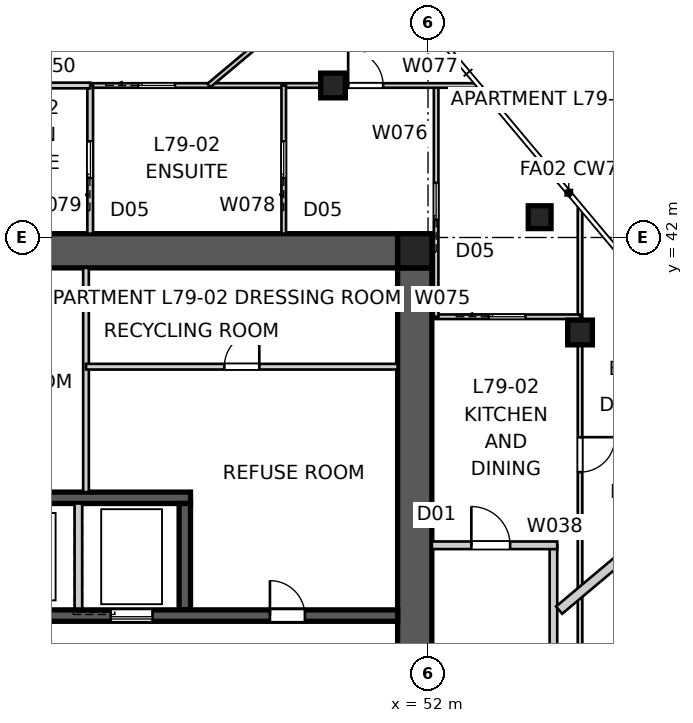
"""IFC4 building model, lengths in metres.
Left out: names, types, materials, properties, quantities, classifications, styles, units other than length and angle.
Written with IfcOpenShell. Run it as: python <this file> out.ifc"""

import sys

from ifc_helpers import new_model, si_unit, direction, frame, frame_2d, origin, origin_2d, place, context, subcontext, project, spatial, polyline, rectangle, outline, extrude, element, fill, save


model = new_model("IFC4")
c1 = context("Model", 3, precision=1e-05, world=origin(), true_north=direction((0.0, 1.0)))
c2 = subcontext(c1, "Body", "Model", "MODEL_VIEW")
j1 = project(units=[si_unit("LENGTHUNIT", "METRE"), si_unit("PLANEANGLEUNIT", "RADIAN")], contexts=[c1])
p1 = place(None, origin())
s1 = spatial("IfcSite", under=j1, at=p1, CompositionType="ELEMENT")
p2 = place(p1, origin())
s2 = spatial("IfcBuilding", under=s1, at=p2, CompositionType="ELEMENT")
p3 = place(p2, frame((0.0, 0.0, 286.2)))
s3 = spatial("IfcBuildingStorey", under=s2, at=p3, CompositionType="ELEMENT", Elevation=286.2)
p4 = place(p3, frame((28.8, 41.65, 0.0), z_axis=(0.0, 0.0, 1.0), x_axis=(1.0, 0.0, 0.0)))
e1 = element("IfcWall", 1, at=p4, inside=s3, PredefinedType="SHEAR", context=c2, shape_type="SweptSolid", body=[
    extrude(outline(polyline([(0.0, -0.45), (22.4, -0.45), (22.4, -0.025), (22.85, -0.025), (22.85, 0.025), (22.4, 0.025), (22.4, 0.45), (0.0, 0.45), (0.0, 0.025), (-0.45, 0.025), (-0.45, -0.025), (0.0, -0.025), (0.0, -0.45)])), origin(), (0.0, 0.0, 1.0), 3.4),
])
p5 = place(p3, frame((51.65, 18.8, 0.0), z_axis=(0.0, 0.0, 1.0), x_axis=(0.0, 1.0, 0.0)))
e2 = element("IfcWall", 2, at=p5, inside=s3, PredefinedType="SHEAR", context=c2, shape_type="SweptSolid", body=[
    extrude(outline(polyline([(0.0, -0.45), (22.4, -0.45), (22.4, -0.025), (22.85, -0.025), (22.85, 0.025), (22.4, 0.025), (22.4, 0.45), (0.0, 0.45), (0.0, 0.025), (-0.45, 0.025), (-0.45, -0.025), (0.0, -0.025), (0.0, -0.45)])), origin(), (0.0, 0.0, 1.0), 3.4),
])
p6 = place(p5, frame((11.14, 0.0, 0.0)))
e3 = element("IfcOpeningElement", 3, at=p6, cuts=e2, PredefinedType="OPENING", context=c2, shape_type="SweptSolid", body=[
    extrude(rectangle(XDim=1.02, YDim=2.4, at=frame_2d((0.51, 1.2))), frame((0.0, 0.46, 0.0), z_axis=(0.0, -1.0, 0.0), x_axis=(1.0, 0.0, 0.0)), (0.0, 0.0, 1.0), 0.92),
])
p7 = place(p3, frame((28.8, 32.05, 0.0), z_axis=(0.0, 0.0, 1.0), x_axis=(1.0, 0.0, 0.0)))
e4 = element("IfcWall", 4, at=p7, inside=s3, PredefinedType="SHEAR", context=c2, shape_type="SweptSolid", body=[
    extrude(rectangle(XDim=22.4, YDim=0.3, at=frame_2d((11.2, 0.0))), origin(), (0.0, 0.0, 1.0), 3.4),
])
p8 = place(p7, frame((19.04, 0.0, 0.0)))
e5 = element("IfcOpeningElement", 5, at=p8, cuts=e4, PredefinedType="OPENING", context=c2, shape_type="SweptSolid", body=[
    extrude(rectangle(XDim=0.92, YDim=2.1, at=frame_2d((0.46, 1.05))), frame((0.0, 0.16, 0.0), z_axis=(0.0, -1.0, 0.0), x_axis=(1.0, 0.0, 0.0)), (0.0, 0.0, 1.0), 0.32),
])
p9 = place(p7, frame((1.265, 0.0, 0.0)))
e6 = element("IfcOpeningElement", 6, at=p9, cuts=e4, PredefinedType="OPENING", context=c2, shape_type="SweptSolid", body=[
    extrude(rectangle(XDim=1.02, YDim=2.1, at=frame_2d((0.51, 1.05))), frame((0.0, 0.16, 0.0), z_axis=(0.0, -1.0, 0.0), x_axis=(1.0, 0.0, 0.0)), (0.0, 0.0, 1.0), 0.32),
])
p10 = place(p7, frame((4.015, 0.0, 0.0)))
e7 = element("IfcOpeningElement", 7, at=p10, cuts=e4, PredefinedType="OPENING", context=c2, shape_type="SweptSolid", body=[
    extrude(rectangle(XDim=0.92, YDim=2.1, at=frame_2d((0.46, 1.05))), frame((0.0, 0.16, 0.0), z_axis=(0.0, -1.0, 0.0), x_axis=(1.0, 0.0, 0.0)), (0.0, 0.0, 1.0), 0.32),
])
p11 = place(p7, frame((6.115, 0.0, 0.0)))
e8 = element("IfcOpeningElement", 8, at=p11, cuts=e4, PredefinedType="OPENING", context=c2, shape_type="SweptSolid", body=[
    extrude(rectangle(XDim=0.92, YDim=2.1, at=frame_2d((0.46, 1.05))), frame((0.0, 0.16, 0.0), z_axis=(0.0, -1.0, 0.0), x_axis=(1.0, 0.0, 0.0)), (0.0, 0.0, 1.0), 0.32),
])
p12 = place(p7, frame((9.79, 0.0, 0.0)))
e9 = element("IfcOpeningElement", 9, at=p12, cuts=e4, PredefinedType="OPENING", context=c2, shape_type="SweptSolid", body=[
    extrude(rectangle(XDim=0.92, YDim=2.1, at=frame_2d((0.46, 1.05))), frame((0.0, 0.16, 0.0), z_axis=(0.0, -1.0, 0.0), x_axis=(1.0, 0.0, 0.0)), (0.0, 0.0, 1.0), 0.32),
])
p13 = place(p7, frame((12.05, 0.0, 0.0)))
e10 = element("IfcOpeningElement", 10, at=p13, cuts=e4, PredefinedType="OPENING", context=c2, shape_type="SweptSolid", body=[
    extrude(rectangle(XDim=1.1, YDim=2.1, at=frame_2d((0.55, 1.05))), frame((0.0, 0.16, 0.0), z_axis=(0.0, -1.0, 0.0), x_axis=(1.0, 0.0, 0.0)), (0.0, 0.0, 1.0), 0.32),
])
p14 = place(p7, frame((14.85, 0.0, 0.0)))
e11 = element("IfcOpeningElement", 11, at=p14, cuts=e4, PredefinedType="OPENING", context=c2, shape_type="SweptSolid", body=[
    extrude(rectangle(XDim=1.1, YDim=2.1, at=frame_2d((0.55, 1.05))), frame((0.0, 0.16, 0.0), z_axis=(0.0, -1.0, 0.0), x_axis=(1.0, 0.0, 0.0)), (0.0, 0.0, 1.0), 0.32),
])
p15 = place(p3, frame((34.25, 35.15, 0.0), z_axis=(0.0, 0.0, 1.0), x_axis=(1.0, 0.0, 0.0)))
e12 = element("IfcWall", 12, at=p15, inside=s3, PredefinedType="SHEAR", context=c2, shape_type="SweptSolid", body=[
    extrude(rectangle(XDim=11.5, YDim=0.3, at=frame_2d((5.75, 0.0))), origin(), (0.0, 0.0, 1.0), 3.4),
])
p16 = place(p3, frame((42.8, 32.2, 0.0), z_axis=(0.0, 0.0, 1.0), x_axis=(0.0, 1.0, 0.0)))
e13 = element("IfcWall", 13, at=p16, inside=s3, PredefinedType="SOLIDWALL", context=c2, shape_type="SweptSolid", body=[
    extrude(rectangle(XDim=2.8, YDim=0.2, at=frame_2d((1.4, 0.0))), origin(), (0.0, 0.0, 1.0), 3.4),
])
p17 = place(p3, frame((45.6, 32.2, 0.0), z_axis=(0.0, 0.0, 1.0), x_axis=(0.0, 1.0, 0.0)))
e14 = element("IfcWall", 14, at=p17, inside=s3, PredefinedType="SHEAR", context=c2, shape_type="SweptSolid", body=[
    extrude(rectangle(XDim=2.8, YDim=0.3, at=frame_2d((1.4, 0.0))), origin(), (0.0, 0.0, 1.0), 3.4),
])
p18 = place(p3, frame((51.65, 41.65, 0.0), z_axis=(0.0, 0.0, 1.0), x_axis=(1.0, 0.0, 0.0)))
e15 = element("IfcColumn", 15, at=p18, inside=s3, PredefinedType="COLUMN", context=c2, shape_type="SweptSolid", body=[
    extrude(rectangle(XDim=0.9, YDim=0.9, at=origin_2d()), origin(), (0.0, 0.0, 1.0), 3.4),
])
p19 = place(p3, frame((54.938, 42.534, 0.0), z_axis=(0.0, 0.0, 1.0), x_axis=(1.0, 0.0, 0.0)))
e16 = element("IfcColumn", 16, at=p19, inside=s3, PredefinedType="COLUMN", context=c2, shape_type="SweptSolid", body=[
    extrude(rectangle(XDim=0.6, YDim=0.6, at=origin_2d()), origin(), (0.0, 0.0, 1.0), 3.4),
])
for number, where, z_axis, x_axis in (
    (17, (56.0, 39.5, 0.0), (0.0, 0.0, 1.0), (1.0, 0.0, 0.0)),
    (18, (49.5, 46.0, 0.0), (0.0, 0.0, 1.0), (1.0, 0.0, 0.0)),
):
    element("IfcColumn", number, at=place(p3, frame(where, z_axis=z_axis, x_axis=x_axis)), inside=s3, PredefinedType="COLUMN", context=c2, shape_type="SweptSolid", body=[
        extrude(rectangle(XDim=0.65, YDim=0.65, at=origin_2d()), origin(), (0.0, 0.0, 1.0), 3.4),
    ])
p20 = place(p3, frame((55.3, 26.1, 0.0), z_axis=(0.0, 0.0, 1.0), x_axis=(0.0, 1.0, 0.0)))
e19 = element("IfcWall", 19, at=p20, inside=s3, PredefinedType="PARTITIONING", context=c2, shape_type="SweptSolid", body=[
    extrude(rectangle(XDim=7.8, YDim=0.2, at=frame_2d((3.9, 0.0))), origin(), (0.0, 0.0, 1.0), 3.25),
])
p21 = place(p3, frame((52.1, 33.9, 0.0), z_axis=(0.0, 0.0, 1.0), x_axis=(1.0, 0.0, 0.0)))
e20 = element("IfcWall", 20, at=p21, inside=s3, PredefinedType="PARTITIONING", context=c2, shape_type="SweptSolid", body=[
    extrude(rectangle(XDim=3.3, YDim=0.2, at=frame_2d((1.65, 0.0))), origin(), (0.0, 0.0, 1.0), 3.25),
])
p22 = place(p21, frame((1.04, 0.0, 0.0)))
e21 = element("IfcOpeningElement", 21, at=p22, cuts=e20, PredefinedType="OPENING", context=c2, shape_type="SweptSolid", body=[
    extrude(rectangle(XDim=1.02, YDim=2.34, at=frame_2d((0.51, 1.17))), frame((0.0, 0.11, 0.0), z_axis=(0.0, -1.0, 0.0), x_axis=(1.0, 0.0, 0.0)), (0.0, 0.0, 1.0), 0.22),
])
p23 = place(p3, frame((61.007, 36.857, 0.0), z_axis=(0.0, 0.0, 1.0), x_axis=(-0.766054150891, -0.642776040237, 0.0)))
e22 = element("IfcWall", 22, at=p23, inside=s3, PredefinedType="PARTITIONING", context=c2, shape_type="SweptSolid", body=[
    extrude(rectangle(XDim=7.254, YDim=0.25, at=frame_2d((3.627, 0.0))), origin(), (0.0, 0.0, 1.0), 3.25),
])
p24 = place(p3, frame((43.0, 41.2, 0.0), z_axis=(0.0, 0.0, 1.0), x_axis=(0.0, -1.0, 0.0)))
e23 = element("IfcWall", 23, at=p24, inside=s3, PredefinedType="SOLIDWALL", context=c2, shape_type="SweptSolid", body=[
    extrude(rectangle(XDim=5.9, YDim=0.15, at=frame_2d((2.95, 0.0))), origin(), (0.0, 0.0, 1.0), 3.25),
])
p25 = place(p3, frame((43.0, 38.6, 0.0), z_axis=(0.0, 0.0, 1.0), x_axis=(1.0, 0.0, 0.0)))
e24 = element("IfcWall", 24, at=p25, inside=s3, PredefinedType="SOLIDWALL", context=c2, shape_type="SweptSolid", body=[
    extrude(rectangle(XDim=8.2, YDim=0.15, at=frame_2d((4.1, 0.0))), origin(), (0.0, 0.0, 1.0), 3.25),
])
p26 = place(p25, frame((3.64, 0.0, 0.0)))
e25 = element("IfcOpeningElement", 25, at=p26, cuts=e24, PredefinedType="OPENING", context=c2, shape_type="SweptSolid", body=[
    extrude(rectangle(XDim=0.92, YDim=2.1, at=frame_2d((0.46, 1.05))), frame((0.0, 0.085, 0.0), z_axis=(0.0, -1.0, 0.0), x_axis=(1.0, 0.0, 0.0)), (0.0, 0.0, 1.0), 0.17),
])
p27 = place(p3, frame((56.0, 42.762, 0.0), z_axis=(0.0, 0.0, 1.0), x_axis=(0.0, -1.0, 0.0)))
e26 = element("IfcWall", 26, at=p27, inside=s3, PredefinedType="PARTITIONING", context=c2, shape_type="SweptSolid", body=[
    extrude(rectangle(XDim=18.995, YDim=0.12, at=frame_2d((9.498, 0.0))), origin(), (0.0, 0.0, 1.0), 2.55),
])
p28 = place(p27, frame((17.238, 0.0, 0.0)))
e27 = element("IfcOpeningElement", 27, at=p28, cuts=e26, PredefinedType="OPENING", context=c2, shape_type="SweptSolid", body=[
    extrude(rectangle(XDim=0.92, YDim=2.34, at=frame_2d((0.46, 1.17))), frame((0.0, 0.07, 0.0), z_axis=(0.0, -1.0, 0.0), x_axis=(1.0, 0.0, 0.0)), (0.0, 0.0, 1.0), 0.14),
])
p29 = place(p27, frame((6.017, 0.0, 0.0)))
e28 = element("IfcOpeningElement", 28, at=p29, cuts=e26, PredefinedType="OPENING", context=c2, shape_type="SweptSolid", body=[
    extrude(rectangle(XDim=0.92, YDim=2.34, at=frame_2d((0.46, 1.17))), frame((0.0, 0.07, 0.0), z_axis=(0.0, -1.0, 0.0), x_axis=(1.0, 0.0, 0.0)), (0.0, 0.0, 1.0), 0.14),
])
p30 = place(p3, frame((52.163, 39.914, 0.0), z_axis=(0.0, 0.0, 1.0), x_axis=(1.0, 0.0, 0.0)))
e29 = element("IfcWall", 29, at=p30, inside=s3, PredefinedType="PARTITIONING", context=c2, shape_type="SweptSolid", body=[
    extrude(rectangle(XDim=3.837, YDim=0.12, at=frame_2d((1.918, 0.0))), origin(), (0.0, 0.0, 1.0), 3.25),
])
p31 = place(p30, frame((1.438, 0.0, 0.0)))
e30 = element("IfcOpeningElement", 30, at=p31, cuts=e29, PredefinedType="OPENING", context=c2, shape_type="SweptSolid", body=[
    extrude(rectangle(XDim=0.96, YDim=2.1, at=frame_2d((0.48, 1.05))), frame((0.0, 0.07, 0.0), z_axis=(0.0, -1.0, 0.0), x_axis=(1.0, 0.0, 0.0)), (0.0, 0.0, 1.0), 0.14),
])
p32 = place(p3, frame((52.213, 39.914, 0.0), z_axis=(0.0, 0.0, 1.0), x_axis=(0.0, 1.0, 0.0)))
e31 = element("IfcWall", 31, at=p32, inside=s3, PredefinedType="PARTITIONING", context=c2, shape_type="SweptSolid", body=[
    extrude(rectangle(XDim=6.086, YDim=0.12, at=frame_2d((3.043, 0.0))), origin(), (0.0, 0.0, 1.0), 3.25),
])
p33 = place(p32, frame((2.563, 0.0, 0.0)))
e32 = element("IfcOpeningElement", 32, at=p33, cuts=e31, PredefinedType="OPENING", context=c2, shape_type="SweptSolid", body=[
    extrude(rectangle(XDim=0.96, YDim=2.1, at=frame_2d((0.48, 1.05))), frame((0.0, 0.07, 0.0), z_axis=(0.0, -1.0, 0.0), x_axis=(1.0, 0.0, 0.0)), (0.0, 0.0, 1.0), 0.14),
])
p34 = place(p3, frame((43.11, 46.0, 0.0), z_axis=(0.0, 0.0, 1.0), x_axis=(1.0, 0.0, 0.0)))
e33 = element("IfcWall", 33, at=p34, inside=s3, PredefinedType="PARTITIONING", context=c2, shape_type="SweptSolid", body=[
    extrude(rectangle(XDim=10.173, YDim=0.12, at=frame_2d((5.086, 0.0))), origin(), (0.0, 0.0, 1.0), 2.55),
])
p35 = place(p34, frame((6.788, 0.0, 0.0)))
e34 = element("IfcOpeningElement", 34, at=p35, cuts=e33, PredefinedType="OPENING", context=c2, shape_type="SweptSolid", body=[
    extrude(rectangle(XDim=0.92, YDim=2.34, at=frame_2d((0.46, 1.17))), frame((0.0, 0.07, 0.0), z_axis=(0.0, -1.0, 0.0), x_axis=(1.0, 0.0, 0.0)), (0.0, 0.0, 1.0), 0.14),
])
p36 = place(p34, frame((1.271, 0.0, 0.0)))
e35 = element("IfcOpeningElement", 35, at=p36, cuts=e33, PredefinedType="OPENING", context=c2, shape_type="SweptSolid", body=[
    extrude(rectangle(XDim=0.96, YDim=2.1, at=frame_2d((0.48, 1.05))), frame((0.0, 0.07, 0.0), z_axis=(0.0, -1.0, 0.0), x_axis=(1.0, 0.0, 0.0)), (0.0, 0.0, 1.0), 0.14),
])
p37 = place(p3, frame((48.203, 42.1, 0.0), z_axis=(0.0, 0.0, 1.0), x_axis=(0.0, 1.0, 0.0)))
e36 = element("IfcWall", 36, at=p37, inside=s3, PredefinedType="PARTITIONING", context=c2, shape_type="SweptSolid", body=[
    extrude(rectangle(XDim=3.9, YDim=0.12, at=frame_2d((1.95, 0.0))), origin(), (0.0, 0.0, 1.0), 3.25),
])
p38 = place(p37, frame((1.47, 0.0, 0.0)))
e37 = element("IfcOpeningElement", 37, at=p38, cuts=e36, PredefinedType="OPENING", context=c2, shape_type="SweptSolid", body=[
    extrude(rectangle(XDim=0.96, YDim=2.1, at=frame_2d((0.48, 1.05))), frame((0.0, 0.07, 0.0), z_axis=(0.0, -1.0, 0.0), x_axis=(1.0, 0.0, 0.0)), (0.0, 0.0, 1.0), 0.14),
])
p39 = place(p3, frame((43.11, 42.1, 0.0), z_axis=(0.0, 0.0, 1.0), x_axis=(0.0, 1.0, 0.0)))
e38 = element("IfcWall", 38, at=p39, inside=s3, PredefinedType="SOLIDWALL", context=c2, shape_type="SweptSolid", body=[
    extrude(rectangle(XDim=3.9, YDim=0.15, at=frame_2d((1.95, 0.0))), origin(), (0.0, 0.0, 1.0), 3.25),
])
p40 = place(p39, frame((1.47, 0.0, 0.0)))
e39 = element("IfcOpeningElement", 39, at=p40, cuts=e38, PredefinedType="OPENING", context=c2, shape_type="SweptSolid", body=[
    extrude(rectangle(XDim=0.96, YDim=2.1, at=frame_2d((0.48, 1.05))), frame((0.0, 0.085, 0.0), z_axis=(0.0, -1.0, 0.0), x_axis=(1.0, 0.0, 0.0)), (0.0, 0.0, 1.0), 0.17),
])
p41 = place(p3, frame((39.153, 46.0, 0.0), z_axis=(0.0, 0.0, 1.0), x_axis=(1.0, 0.0, 0.0)))
e40 = element("IfcWall", 40, at=p41, inside=s3, PredefinedType="SOLIDWALL", context=c2, shape_type="SweptSolid", body=[
    extrude(rectangle(XDim=3.958, YDim=0.15, at=frame_2d((1.979, 0.0))), origin(), (0.0, 0.0, 1.0), 3.25),
])
p42 = place(p3, frame((47.719, 52.631, 0.0), z_axis=(0.0, 0.0, 1.0), x_axis=(-0.766052076481, -0.64277851249, 0.0)))
e41 = element("IfcWall", 41, at=p42, inside=s3, PredefinedType="PARTITIONING", context=c2, shape_type="SweptSolid", body=[
    extrude(rectangle(XDim=10.316, YDim=0.12, at=frame_2d((5.158, 0.0))), origin(), (0.0, 0.0, 1.0), 3.25),
])
p43 = place(p3, frame((50.37, 49.471, 0.0), z_axis=(0.0, 0.0, 1.0), x_axis=(-0.766056536168, -0.642773197476, 0.0)))
e42 = element("IfcWall", 42, at=p43, inside=s3, PredefinedType="PARTITIONING", context=c2, shape_type="SweptSolid", body=[
    extrude(rectangle(XDim=5.4, YDim=0.12, at=frame_2d((2.7, 0.0))), origin(), (0.0, 0.0, 1.0), 3.25),
])
p44 = place(p8, origin())
e43 = element("IfcDoor", 43, at=p44, inside=s3, OperationType="SINGLE_SWING_LEFT", PredefinedType="DOOR", context=c2, shape_type="SweptSolid", body=[
    extrude(rectangle(XDim=0.92, YDim=2.1, at=frame_2d((0.46, 1.05))), frame((0.0, 0.025, 0.0), z_axis=(0.0, -1.0, 0.0), x_axis=(1.0, 0.0, 0.0)), (0.0, 0.0, 1.0), 0.05),
])
fill(e5, e43)
p45 = place(p22, origin())
e44 = element("IfcDoor", 44, at=p45, inside=s3, OperationType="SINGLE_SWING_LEFT", PredefinedType="DOOR", context=c2, shape_type="SweptSolid", body=[
    extrude(rectangle(XDim=1.02, YDim=2.34, at=frame_2d((0.51, 1.17))), frame((0.0, 0.025, 0.0), z_axis=(0.0, -1.0, 0.0), x_axis=(1.0, 0.0, 0.0)), (0.0, 0.0, 1.0), 0.05),
])
fill(e21, e44)
p46 = place(p26, origin())
e45 = element("IfcDoor", 45, at=p46, inside=s3, OperationType="SINGLE_SWING_RIGHT", PredefinedType="DOOR", context=c2, shape_type="SweptSolid", body=[
    extrude(rectangle(XDim=0.92, YDim=2.1, at=frame_2d((0.46, 1.05))), frame((0.0, 0.025, 0.0), z_axis=(0.0, -1.0, 0.0), x_axis=(1.0, 0.0, 0.0)), (0.0, 0.0, 1.0), 0.05),
])
fill(e25, e45)
p47 = place(p29, origin())
e46 = element("IfcDoor", 46, at=p47, inside=s3, OperationType="SINGLE_SWING_LEFT", PredefinedType="DOOR", context=c2, shape_type="SweptSolid", body=[
    extrude(rectangle(XDim=0.92, YDim=2.34, at=frame_2d((0.46, 1.17))), frame((0.0, 0.025, 0.0), z_axis=(0.0, -1.0, 0.0), x_axis=(1.0, 0.0, 0.0)), (0.0, 0.0, 1.0), 0.05),
])
fill(e28, e46)
p48 = place(p31, origin())
e47 = element("IfcDoor", 47, at=p48, inside=s3, OperationType="SLIDING_TO_LEFT", PredefinedType="DOOR", context=c2, shape_type="SweptSolid", body=[
    extrude(rectangle(XDim=0.96, YDim=2.1, at=frame_2d((0.48, 1.05))), frame((0.0, 0.025, 0.0), z_axis=(0.0, -1.0, 0.0), x_axis=(1.0, 0.0, 0.0)), (0.0, 0.0, 1.0), 0.05),
])
fill(e30, e47)
p49 = place(p33, origin())
e48 = element("IfcDoor", 48, at=p49, inside=s3, OperationType="SLIDING_TO_LEFT", PredefinedType="DOOR", context=c2, shape_type="SweptSolid", body=[
    extrude(rectangle(XDim=0.96, YDim=2.1, at=frame_2d((0.48, 1.05))), frame((0.0, 0.025, 0.0), z_axis=(0.0, -1.0, 0.0), x_axis=(1.0, 0.0, 0.0)), (0.0, 0.0, 1.0), 0.05),
])
fill(e32, e48)
p50 = place(p35, origin())
e49 = element("IfcDoor", 49, at=p50, inside=s3, OperationType="SINGLE_SWING_LEFT", PredefinedType="DOOR", context=c2, shape_type="SweptSolid", body=[
    extrude(rectangle(XDim=0.92, YDim=2.34, at=frame_2d((0.46, 1.17))), frame((0.0, 0.025, 0.0), z_axis=(0.0, -1.0, 0.0), x_axis=(1.0, 0.0, 0.0)), (0.0, 0.0, 1.0), 0.05),
])
fill(e34, e49)
p51 = place(p38, origin())
e50 = element("IfcDoor", 50, at=p51, inside=s3, OperationType="SLIDING_TO_LEFT", PredefinedType="DOOR", context=c2, shape_type="SweptSolid", body=[
    extrude(rectangle(XDim=0.96, YDim=2.1, at=frame_2d((0.48, 1.05))), frame((0.0, 0.025, 0.0), z_axis=(0.0, -1.0, 0.0), x_axis=(1.0, 0.0, 0.0)), (0.0, 0.0, 1.0), 0.05),
])
fill(e37, e50)
p52 = place(p40, origin())
e51 = element("IfcDoor", 51, at=p52, inside=s3, OperationType="SLIDING_TO_LEFT", PredefinedType="DOOR", context=c2, shape_type="SweptSolid", body=[
    extrude(rectangle(XDim=0.96, YDim=2.1, at=frame_2d((0.48, 1.05))), frame((0.0, 0.025, 0.0), z_axis=(0.0, -1.0, 0.0), x_axis=(1.0, 0.0, 0.0)), (0.0, 0.0, 1.0), 0.05),
])
fill(e39, e51)
p53 = place(p36, origin())
e52 = element("IfcDoor", 52, at=p53, inside=s3, OperationType="SLIDING_TO_LEFT", PredefinedType="DOOR", context=c2, shape_type="SweptSolid", body=[
    extrude(rectangle(XDim=0.96, YDim=2.1, at=frame_2d((0.48, 1.05))), frame((0.0, 0.025, 0.0), z_axis=(0.0, -1.0, 0.0), x_axis=(1.0, 0.0, 0.0)), (0.0, 0.0, 1.0), 0.05),
])
fill(e35, e52)
p54 = place(p14, origin())
e53 = element("IfcDoor", 53, at=p54, inside=s3, OperationType="SLIDING_TO_LEFT", PredefinedType="DOOR", context=c2, shape_type="SweptSolid", body=[
    extrude(rectangle(XDim=1.1, YDim=2.1, at=frame_2d((0.55, 1.05))), frame((0.0, 0.025, 0.0), z_axis=(0.0, -1.0, 0.0), x_axis=(1.0, 0.0, 0.0)), (0.0, 0.0, 1.0), 0.05),
])
fill(e11, e53)
save(model, sys.argv[1])
